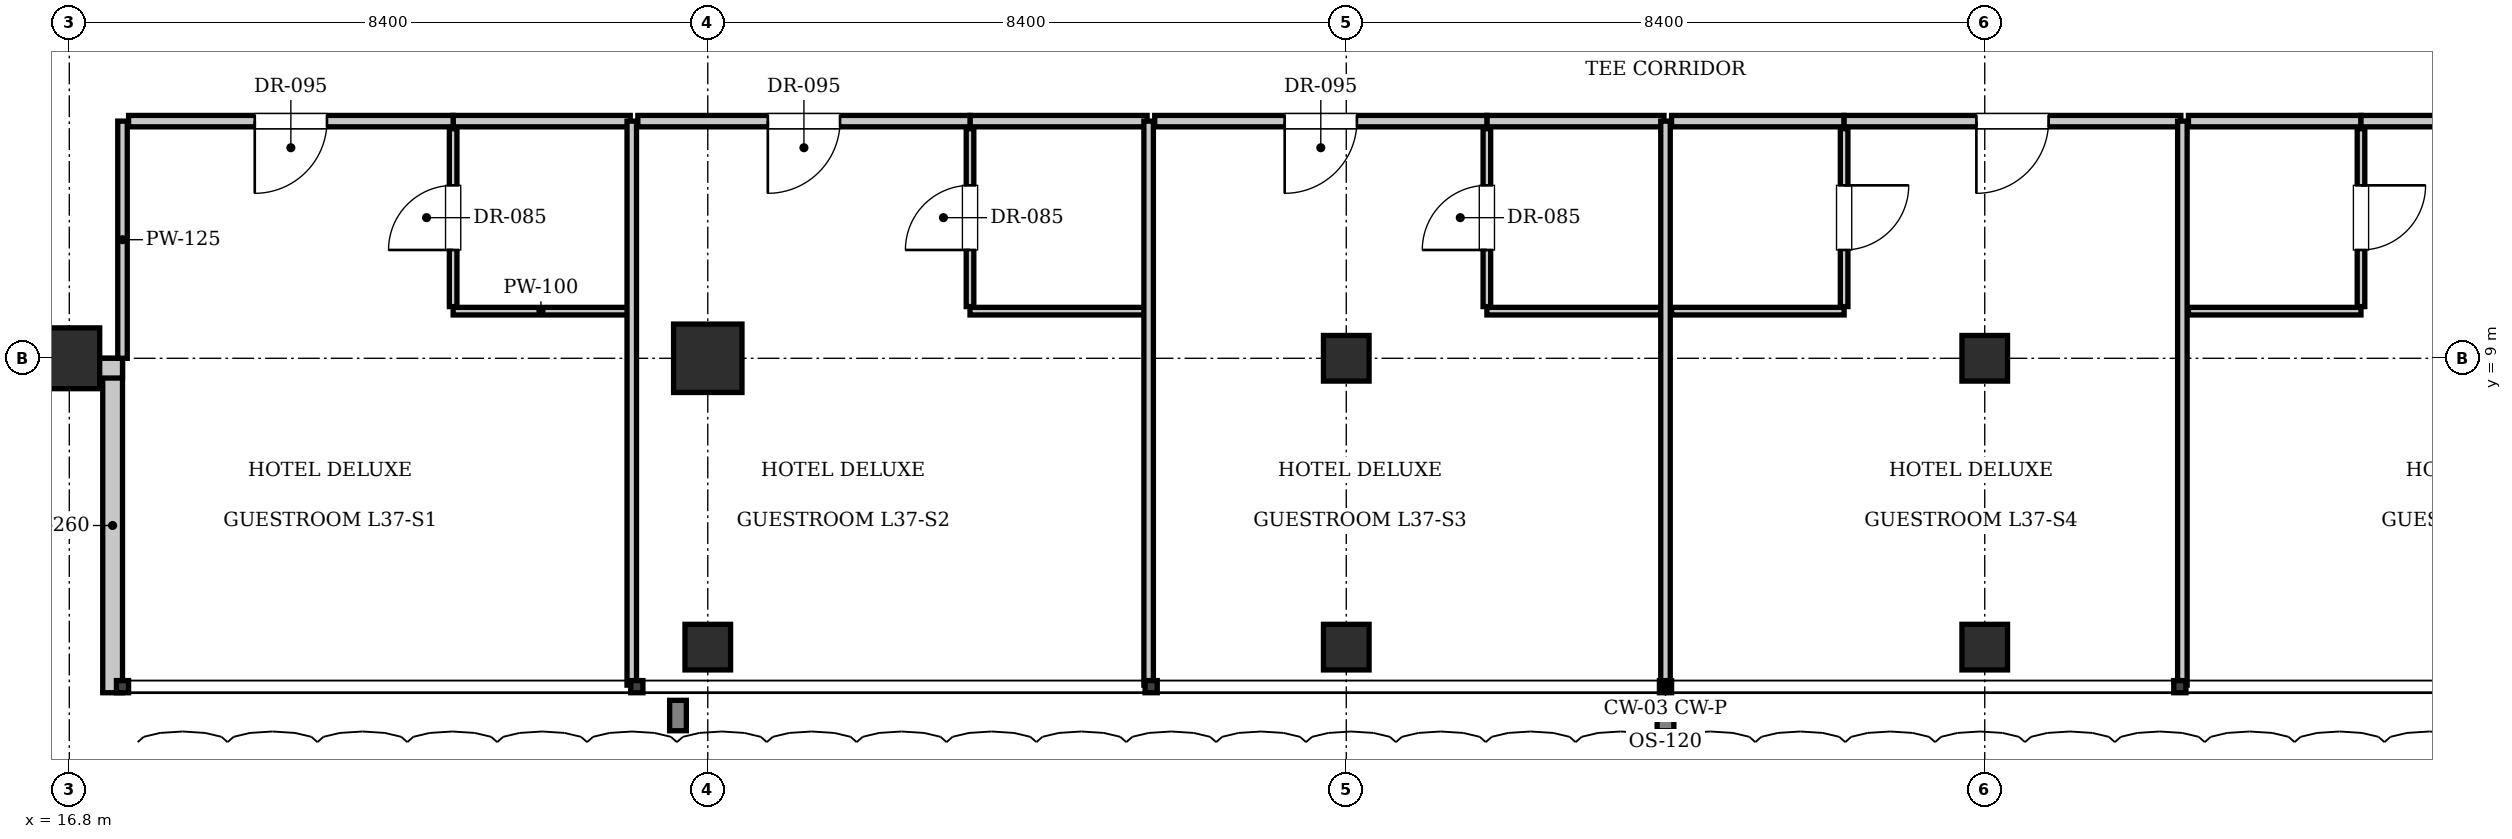
"""IFC4 building model, lengths in metres.
Left out: names, types, materials, properties, quantities, classifications, styles, units other than length and angle.
Written with IfcOpenShell. Run it as: python <this file> out.ifc"""

import sys

from ifc_helpers import new_model, si_unit, direction, frame, frame_2d, origin, origin_2d, place, context, subcontext, project, spatial, rectangle, i_section, extrude, element, fill, save


model = new_model("IFC4")
c1 = context("Model", 3, precision=1e-05, world=origin(), true_north=direction((0.0, 1.0)))
c2 = subcontext(c1, "Body", "Model", "MODEL_VIEW")
j1 = project(units=[si_unit("LENGTHUNIT", "METRE"), si_unit("PLANEANGLEUNIT", "RADIAN")], contexts=[c1])
p1 = place(None, origin())
s1 = spatial("IfcSite", under=j1, at=p1, CompositionType="ELEMENT")
p2 = place(p1, origin())
s2 = spatial("IfcBuilding", under=s1, at=p2, CompositionType="ELEMENT")
p3 = place(p2, frame((0.0, 0.0, 154.35)))
s3 = spatial("IfcBuildingStorey", under=s2, at=p3, CompositionType="ELEMENT", Elevation=154.35)
p4 = place(p3, frame((25.2, 9.0, 0.0), z_axis=(0.0, 0.0, 1.0), x_axis=(1.0, 0.0, 0.0)))
e1 = element("IfcColumn", 1, at=p4, inside=s3, PredefinedType="COLUMN", context=c2, shape_type="SweptSolid", body=[
    extrude(rectangle(XDim=0.9, YDim=0.9, at=origin_2d()), origin(), (0.0, 0.0, 1.0), 3.85),
])
for number, where, z_axis, x_axis in (
    (2, (33.6, 9.0, 0.0), (0.0, 0.0, 1.0), (1.0, 0.0, 0.0)),
    (3, (42.0, 9.0, 0.0), (0.0, 0.0, 1.0), (1.0, 0.0, 0.0)),
):
    element("IfcColumn", number, at=place(p3, frame(where, z_axis=z_axis, x_axis=x_axis)), inside=s3, PredefinedType="COLUMN", context=c2, shape_type="SweptSolid", body=[
        extrude(i_section(OverallWidth=0.6, OverallDepth=0.6, WebThickness=0.025, FlangeThickness=0.038, at=origin_2d()), origin(), (0.0, 0.0, 1.0), 3.85),
    ])
p5 = place(p3, frame((16.8, 9.0, 0.0), z_axis=(0.0, 0.0, 1.0), x_axis=(1.0, 0.0, 0.0)))
e4 = element("IfcColumn", 4, at=p5, inside=s3, PredefinedType="COLUMN", context=c2, shape_type="SweptSolid", body=[
    extrude(rectangle(XDim=0.8, YDim=0.8, at=origin_2d()), origin(), (0.0, 0.0, 1.0), 3.85),
])
for number, where, z_axis, x_axis in (
    (5, (25.2, 5.2, 0.0), (0.0, 0.0, 1.0), (1.0, 0.0, 0.0)),
    (6, (33.6, 5.2, 0.0), (0.0, 0.0, 1.0), (1.0, 0.0, 0.0)),
    (7, (42.0, 5.2, 0.0), (0.0, 0.0, 1.0), (1.0, 0.0, 0.0)),
):
    element("IfcColumn", number, at=place(p3, frame(where, z_axis=z_axis, x_axis=x_axis)), inside=s3, PredefinedType="COLUMN", context=c2, shape_type="SweptSolid", body=[
        extrude(i_section(OverallWidth=0.6, OverallDepth=0.6, WebThickness=0.025, FlangeThickness=0.038, at=origin_2d()), origin(), (0.0, 0.0, 1.0), 3.85),
    ])
p6 = place(p3, frame((17.37, 4.6, 0.0), z_axis=(0.0, 0.0, 1.0), x_axis=(0.0, 1.0, 0.0)))
e8 = element("IfcWall", 8, at=p6, inside=s3, PredefinedType="SOLIDWALL", context=c2, shape_type="SweptSolid", body=[
    extrude(rectangle(XDim=4.4, YDim=0.26, at=frame_2d((2.2, 0.0))), origin(), (0.0, 0.0, 1.0), 3.61),
])
p7 = place(p3, frame((17.5, 8.87, 0.0), z_axis=(0.0, 0.0, 1.0), x_axis=(-1.0, 0.0, 0.0)))
e9 = element("IfcWall", 9, at=p7, inside=s3, PredefinedType="SOLIDWALL", context=c2, shape_type="SweptSolid", body=[
    extrude(rectangle(XDim=4.4, YDim=0.26, at=frame_2d((2.2, 0.0))), origin(), (0.0, 0.0, 1.0), 3.007),
])
p8 = place(p3, frame((17.5, 9.0, 0.0), z_axis=(0.0, 0.0, 1.0), x_axis=(0.0, 1.0, 0.0)))
e10 = element("IfcWall", 10, at=p8, inside=s3, PredefinedType="PARTITIONING", context=c2, shape_type="SweptSolid", body=[
    extrude(rectangle(XDim=3.12, YDim=0.125, at=frame_2d((1.56, 0.0))), origin(), (0.0, 0.0, 1.0), 3.61),
])
p9 = place(p3, frame((21.85, 12.12, 0.0), z_axis=(0.0, 0.0, 1.0), x_axis=(1.0, 0.0, 0.0)))
e11 = element("IfcWall", 11, at=p9, inside=s3, PredefinedType="PARTITIONING", context=c2, shape_type="SweptSolid", body=[
    extrude(rectangle(XDim=2.33, YDim=0.15, at=frame_2d((1.165, 0.0))), origin(), (0.0, 0.0, 1.0), 3.61),
])
p10 = place(p3, frame((21.85, 9.62, 0.0), z_axis=(0.0, 0.0, 1.0), x_axis=(1.0, 0.0, 0.0)))
e12 = element("IfcWall", 12, at=p10, inside=s3, PredefinedType="PARTITIONING", context=c2, shape_type="SweptSolid", body=[
    extrude(rectangle(XDim=2.31, YDim=0.1, at=frame_2d((1.155, 0.0))), origin(), (0.0, 0.0, 1.0), 3.61),
])
p11 = place(p3, frame((21.85, 9.68, 0.0), z_axis=(0.0, 0.0, 1.0), x_axis=(0.0, 1.0, 0.0)))
e13 = element("IfcWall", 13, at=p11, inside=s3, PredefinedType="PARTITIONING", context=c2, shape_type="SweptSolid", body=[
    extrude(rectangle(XDim=2.34, YDim=0.1, at=frame_2d((1.17, 0.0))), origin(), (0.0, 0.0, 1.0), 3.61),
])
p12 = place(p11, frame((0.745, 0.0, 0.0)))
e14 = element("IfcOpeningElement", 14, at=p12, cuts=e13, PredefinedType="OPENING", context=c2, shape_type="SweptSolid", body=[
    extrude(rectangle(XDim=0.85, YDim=2.1, at=frame_2d((0.425, 1.05))), frame((0.0, 0.06, 0.0), z_axis=(0.0, -1.0, 0.0), x_axis=(1.0, 0.0, 0.0)), (0.0, 0.0, 1.0), 0.12),
])
p13 = place(p3, frame((17.58, 12.12, 0.0), z_axis=(0.0, 0.0, 1.0), x_axis=(1.0, 0.0, 0.0)))
e15 = element("IfcWall", 15, at=p13, inside=s3, PredefinedType="PARTITIONING", context=c2, shape_type="SweptSolid", body=[
    extrude(rectangle(XDim=4.27, YDim=0.15, at=frame_2d((2.135, 0.0))), origin(), (0.0, 0.0, 1.0), 3.61),
])
p14 = place(p13, frame((1.66, 0.0, 0.0)))
e16 = element("IfcOpeningElement", 16, at=p14, cuts=e15, PredefinedType="OPENING", context=c2, shape_type="SweptSolid", body=[
    extrude(rectangle(XDim=0.95, YDim=2.15, at=frame_2d((0.475, 1.075))), frame((0.0, 0.085, 0.0), z_axis=(0.0, -1.0, 0.0), x_axis=(1.0, 0.0, 0.0)), (0.0, 0.0, 1.0), 0.17),
])
p15 = place(p3, frame((24.2, 4.7, 0.0), z_axis=(0.0, 0.0, 1.0), x_axis=(0.0, 1.0, 0.0)))
e17 = element("IfcWall", 17, at=p15, inside=s3, PredefinedType="PARTITIONING", context=c2, shape_type="SweptSolid", body=[
    extrude(rectangle(XDim=7.42, YDim=0.125, at=frame_2d((3.71, 0.0))), origin(), (0.0, 0.0, 1.0), 3.61),
])
p16 = place(p3, frame((28.65, 12.12, 0.0), z_axis=(0.0, 0.0, 1.0), x_axis=(1.0, 0.0, 0.0)))
e18 = element("IfcWall", 18, at=p16, inside=s3, PredefinedType="PARTITIONING", context=c2, shape_type="SweptSolid", body=[
    extrude(rectangle(XDim=2.33, YDim=0.15, at=frame_2d((1.165, 0.0))), origin(), (0.0, 0.0, 1.0), 3.61),
])
p17 = place(p3, frame((28.65, 9.62, 0.0), z_axis=(0.0, 0.0, 1.0), x_axis=(1.0, 0.0, 0.0)))
e19 = element("IfcWall", 19, at=p17, inside=s3, PredefinedType="PARTITIONING", context=c2, shape_type="SweptSolid", body=[
    extrude(rectangle(XDim=2.31, YDim=0.1, at=frame_2d((1.155, 0.0))), origin(), (0.0, 0.0, 1.0), 3.61),
])
p18 = place(p3, frame((28.65, 9.68, 0.0), z_axis=(0.0, 0.0, 1.0), x_axis=(0.0, 1.0, 0.0)))
e20 = element("IfcWall", 20, at=p18, inside=s3, PredefinedType="PARTITIONING", context=c2, shape_type="SweptSolid", body=[
    extrude(rectangle(XDim=2.34, YDim=0.1, at=frame_2d((1.17, 0.0))), origin(), (0.0, 0.0, 1.0), 3.61),
])
p19 = place(p18, frame((0.745, 0.0, 0.0)))
e21 = element("IfcOpeningElement", 21, at=p19, cuts=e20, PredefinedType="OPENING", context=c2, shape_type="SweptSolid", body=[
    extrude(rectangle(XDim=0.85, YDim=2.1, at=frame_2d((0.425, 1.05))), frame((0.0, 0.06, 0.0), z_axis=(0.0, -1.0, 0.0), x_axis=(1.0, 0.0, 0.0)), (0.0, 0.0, 1.0), 0.12),
])
p20 = place(p3, frame((24.28, 12.12, 0.0), z_axis=(0.0, 0.0, 1.0), x_axis=(1.0, 0.0, 0.0)))
e22 = element("IfcWall", 22, at=p20, inside=s3, PredefinedType="PARTITIONING", context=c2, shape_type="SweptSolid", body=[
    extrude(rectangle(XDim=4.37, YDim=0.15, at=frame_2d((2.185, 0.0))), origin(), (0.0, 0.0, 1.0), 3.61),
])
p21 = place(p20, frame((1.71, 0.0, 0.0)))
e23 = element("IfcOpeningElement", 23, at=p21, cuts=e22, PredefinedType="OPENING", context=c2, shape_type="SweptSolid", body=[
    extrude(rectangle(XDim=0.95, YDim=2.15, at=frame_2d((0.475, 1.075))), frame((0.0, 0.085, 0.0), z_axis=(0.0, -1.0, 0.0), x_axis=(1.0, 0.0, 0.0)), (0.0, 0.0, 1.0), 0.17),
])
p22 = place(p3, frame((31.0, 4.7, 0.0), z_axis=(0.0, 0.0, 1.0), x_axis=(0.0, 1.0, 0.0)))
e24 = element("IfcWall", 24, at=p22, inside=s3, PredefinedType="PARTITIONING", context=c2, shape_type="SweptSolid", body=[
    extrude(rectangle(XDim=7.42, YDim=0.125, at=frame_2d((3.71, 0.0))), origin(), (0.0, 0.0, 1.0), 3.61),
])
p23 = place(p3, frame((35.45, 12.12, 0.0), z_axis=(0.0, 0.0, 1.0), x_axis=(1.0, 0.0, 0.0)))
e25 = element("IfcWall", 25, at=p23, inside=s3, PredefinedType="PARTITIONING", context=c2, shape_type="SweptSolid", body=[
    extrude(rectangle(XDim=2.33, YDim=0.15, at=frame_2d((1.165, 0.0))), origin(), (0.0, 0.0, 1.0), 3.61),
])
p24 = place(p3, frame((35.45, 9.62, 0.0), z_axis=(0.0, 0.0, 1.0), x_axis=(1.0, 0.0, 0.0)))
e26 = element("IfcWall", 26, at=p24, inside=s3, PredefinedType="PARTITIONING", context=c2, shape_type="SweptSolid", body=[
    extrude(rectangle(XDim=2.31, YDim=0.1, at=frame_2d((1.155, 0.0))), origin(), (0.0, 0.0, 1.0), 3.61),
])
p25 = place(p3, frame((35.45, 9.68, 0.0), z_axis=(0.0, 0.0, 1.0), x_axis=(0.0, 1.0, 0.0)))
e27 = element("IfcWall", 27, at=p25, inside=s3, PredefinedType="PARTITIONING", context=c2, shape_type="SweptSolid", body=[
    extrude(rectangle(XDim=2.34, YDim=0.1, at=frame_2d((1.17, 0.0))), origin(), (0.0, 0.0, 1.0), 3.61),
])
p26 = place(p25, frame((0.745, 0.0, 0.0)))
e28 = element("IfcOpeningElement", 28, at=p26, cuts=e27, PredefinedType="OPENING", context=c2, shape_type="SweptSolid", body=[
    extrude(rectangle(XDim=0.85, YDim=2.1, at=frame_2d((0.425, 1.05))), frame((0.0, 0.06, 0.0), z_axis=(0.0, -1.0, 0.0), x_axis=(1.0, 0.0, 0.0)), (0.0, 0.0, 1.0), 0.12),
])
p27 = place(p3, frame((31.08, 12.12, 0.0), z_axis=(0.0, 0.0, 1.0), x_axis=(1.0, 0.0, 0.0)))
e29 = element("IfcWall", 29, at=p27, inside=s3, PredefinedType="PARTITIONING", context=c2, shape_type="SweptSolid", body=[
    extrude(rectangle(XDim=4.37, YDim=0.15, at=frame_2d((2.185, 0.0))), origin(), (0.0, 0.0, 1.0), 3.61),
])
p28 = place(p27, frame((1.71, 0.0, 0.0)))
e30 = element("IfcOpeningElement", 30, at=p28, cuts=e29, PredefinedType="OPENING", context=c2, shape_type="SweptSolid", body=[
    extrude(rectangle(XDim=0.95, YDim=2.15, at=frame_2d((0.475, 1.075))), frame((0.0, 0.085, 0.0), z_axis=(0.0, -1.0, 0.0), x_axis=(1.0, 0.0, 0.0)), (0.0, 0.0, 1.0), 0.17),
])
p29 = place(p3, frame((37.8, 4.7, 0.0), z_axis=(0.0, 0.0, 1.0), x_axis=(0.0, 1.0, 0.0)))
e31 = element("IfcWall", 31, at=p29, inside=s3, PredefinedType="PARTITIONING", context=c2, shape_type="SweptSolid", body=[
    extrude(rectangle(XDim=7.42, YDim=0.125, at=frame_2d((3.71, 0.0))), origin(), (0.0, 0.0, 1.0), 3.3),
])
p30 = place(p3, frame((37.88, 12.12, 0.0), z_axis=(0.0, 0.0, 1.0), x_axis=(1.0, 0.0, 0.0)))
e32 = element("IfcWall", 32, at=p30, inside=s3, PredefinedType="PARTITIONING", context=c2, shape_type="SweptSolid", body=[
    extrude(rectangle(XDim=2.27, YDim=0.15, at=frame_2d((1.135, 0.0))), origin(), (0.0, 0.0, 1.0), 3.61),
])
p31 = place(p3, frame((37.88, 9.62, 0.0), z_axis=(0.0, 0.0, 1.0), x_axis=(1.0, 0.0, 0.0)))
e33 = element("IfcWall", 33, at=p31, inside=s3, PredefinedType="PARTITIONING", context=c2, shape_type="SweptSolid", body=[
    extrude(rectangle(XDim=2.27, YDim=0.1, at=frame_2d((1.135, 0.0))), origin(), (0.0, 0.0, 1.0), 3.61),
])
p32 = place(p3, frame((40.15, 9.68, 0.0), z_axis=(0.0, 0.0, 1.0), x_axis=(0.0, 1.0, 0.0)))
e34 = element("IfcWall", 34, at=p32, inside=s3, PredefinedType="PARTITIONING", context=c2, shape_type="SweptSolid", body=[
    extrude(rectangle(XDim=2.34, YDim=0.1, at=frame_2d((1.17, 0.0))), origin(), (0.0, 0.0, 1.0), 3.61),
])
p33 = place(p32, frame((0.745, 0.0, 0.0)))
e35 = element("IfcOpeningElement", 35, at=p33, cuts=e34, PredefinedType="OPENING", context=c2, shape_type="SweptSolid", body=[
    extrude(rectangle(XDim=0.85, YDim=2.1, at=frame_2d((0.425, 1.05))), frame((0.0, 0.06, 0.0), z_axis=(0.0, -1.0, 0.0), x_axis=(1.0, 0.0, 0.0)), (0.0, 0.0, 1.0), 0.12),
])
p34 = place(p3, frame((40.15, 12.12, 0.0), z_axis=(0.0, 0.0, 1.0), x_axis=(1.0, 0.0, 0.0)))
e36 = element("IfcWall", 36, at=p34, inside=s3, PredefinedType="PARTITIONING", context=c2, shape_type="SweptSolid", body=[
    extrude(rectangle(XDim=4.43, YDim=0.15, at=frame_2d((2.215, 0.0))), origin(), (0.0, 0.0, 1.0), 3.61),
])
p35 = place(p34, frame((1.74, 0.0, 0.0)))
e37 = element("IfcOpeningElement", 37, at=p35, cuts=e36, PredefinedType="OPENING", context=c2, shape_type="SweptSolid", body=[
    extrude(rectangle(XDim=0.95, YDim=2.15, at=frame_2d((0.475, 1.075))), frame((0.0, 0.085, 0.0), z_axis=(0.0, -1.0, 0.0), x_axis=(1.0, 0.0, 0.0)), (0.0, 0.0, 1.0), 0.17),
])
p36 = place(p3, frame((44.6, 4.7, 0.0), z_axis=(0.0, 0.0, 1.0), x_axis=(0.0, 1.0, 0.0)))
e38 = element("IfcWall", 38, at=p36, inside=s3, PredefinedType="PARTITIONING", context=c2, shape_type="SweptSolid", body=[
    extrude(rectangle(XDim=7.42, YDim=0.125, at=frame_2d((3.71, 0.0))), origin(), (0.0, 0.0, 1.0), 3.61),
])
p37 = place(p3, frame((44.68, 12.12, 0.0), z_axis=(0.0, 0.0, 1.0), x_axis=(1.0, 0.0, 0.0)))
e39 = element("IfcWall", 39, at=p37, inside=s3, PredefinedType="PARTITIONING", context=c2, shape_type="SweptSolid", body=[
    extrude(rectangle(XDim=2.27, YDim=0.15, at=frame_2d((1.135, 0.0))), origin(), (0.0, 0.0, 1.0), 3.61),
])
p38 = place(p3, frame((44.68, 9.62, 0.0), z_axis=(0.0, 0.0, 1.0), x_axis=(1.0, 0.0, 0.0)))
e40 = element("IfcWall", 40, at=p38, inside=s3, PredefinedType="PARTITIONING", context=c2, shape_type="SweptSolid", body=[
    extrude(rectangle(XDim=2.27, YDim=0.1, at=frame_2d((1.135, 0.0))), origin(), (0.0, 0.0, 1.0), 3.61),
])
p39 = place(p3, frame((46.95, 9.68, 0.0), z_axis=(0.0, 0.0, 1.0), x_axis=(0.0, 1.0, 0.0)))
e41 = element("IfcWall", 41, at=p39, inside=s3, PredefinedType="PARTITIONING", context=c2, shape_type="SweptSolid", body=[
    extrude(rectangle(XDim=2.34, YDim=0.1, at=frame_2d((1.17, 0.0))), origin(), (0.0, 0.0, 1.0), 3.61),
])
p40 = place(p39, frame((0.745, 0.0, 0.0)))
e42 = element("IfcOpeningElement", 42, at=p40, cuts=e41, PredefinedType="OPENING", context=c2, shape_type="SweptSolid", body=[
    extrude(rectangle(XDim=0.85, YDim=2.1, at=frame_2d((0.425, 1.05))), frame((0.0, 0.06, 0.0), z_axis=(0.0, -1.0, 0.0), x_axis=(1.0, 0.0, 0.0)), (0.0, 0.0, 1.0), 0.12),
])
p41 = place(p3, frame((46.95, 12.12, 0.0), z_axis=(0.0, 0.0, 1.0), x_axis=(1.0, 0.0, 0.0)))
e43 = element("IfcWall", 43, at=p41, inside=s3, PredefinedType="PARTITIONING", context=c2, shape_type="SweptSolid", body=[
    extrude(rectangle(XDim=4.43, YDim=0.15, at=frame_2d((2.215, 0.0))), origin(), (0.0, 0.0, 1.0), 3.61),
])
p42 = place(p41, frame((1.74, 0.0, 0.0)))
e44 = element("IfcOpeningElement", 44, at=p42, cuts=e43, PredefinedType="OPENING", context=c2, shape_type="SweptSolid", body=[
    extrude(rectangle(XDim=0.95, YDim=2.15, at=frame_2d((0.475, 1.075))), frame((0.0, 0.085, 0.0), z_axis=(0.0, -1.0, 0.0), x_axis=(1.0, 0.0, 0.0)), (0.0, 0.0, 1.0), 0.17),
])
p43 = place(p12, origin())
e45 = element("IfcDoor", 45, at=p43, inside=s3, OperationType="SINGLE_SWING_LEFT", PredefinedType="DOOR", context=c2, shape_type="SweptSolid", body=[
    extrude(rectangle(XDim=0.85, YDim=2.1, at=frame_2d((0.425, 1.05))), frame((0.0, 0.025, 0.0), z_axis=(0.0, -1.0, 0.0), x_axis=(1.0, 0.0, 0.0)), (0.0, 0.0, 1.0), 0.05),
])
fill(e14, e45)
p44 = place(p14, frame((0.95, 0.0, 0.0), z_axis=(0.0, 0.0, 1.0), x_axis=(-1.0, 0.0, 0.0)))
e46 = element("IfcDoor", 46, at=p44, inside=s3, OperationType="SINGLE_SWING_RIGHT", PredefinedType="DOOR", context=c2, shape_type="SweptSolid", body=[
    extrude(rectangle(XDim=0.95, YDim=2.15, at=frame_2d((0.475, 1.075))), frame((0.0, 0.025, 0.0), z_axis=(0.0, -1.0, 0.0), x_axis=(1.0, 0.0, 0.0)), (0.0, 0.0, 1.0), 0.05),
])
fill(e16, e46)
p45 = place(p19, origin())
e47 = element("IfcDoor", 47, at=p45, inside=s3, OperationType="SINGLE_SWING_LEFT", PredefinedType="DOOR", context=c2, shape_type="SweptSolid", body=[
    extrude(rectangle(XDim=0.85, YDim=2.1, at=frame_2d((0.425, 1.05))), frame((0.0, 0.025, 0.0), z_axis=(0.0, -1.0, 0.0), x_axis=(1.0, 0.0, 0.0)), (0.0, 0.0, 1.0), 0.05),
])
fill(e21, e47)
p46 = place(p21, frame((0.95, 0.0, 0.0), z_axis=(0.0, 0.0, 1.0), x_axis=(-1.0, 0.0, 0.0)))
e48 = element("IfcDoor", 48, at=p46, inside=s3, OperationType="SINGLE_SWING_RIGHT", PredefinedType="DOOR", context=c2, shape_type="SweptSolid", body=[
    extrude(rectangle(XDim=0.95, YDim=2.15, at=frame_2d((0.475, 1.075))), frame((0.0, 0.025, 0.0), z_axis=(0.0, -1.0, 0.0), x_axis=(1.0, 0.0, 0.0)), (0.0, 0.0, 1.0), 0.05),
])
fill(e23, e48)
p47 = place(p26, origin())
e49 = element("IfcDoor", 49, at=p47, inside=s3, OperationType="SINGLE_SWING_LEFT", PredefinedType="DOOR", context=c2, shape_type="SweptSolid", body=[
    extrude(rectangle(XDim=0.85, YDim=2.1, at=frame_2d((0.425, 1.05))), frame((0.0, 0.025, 0.0), z_axis=(0.0, -1.0, 0.0), x_axis=(1.0, 0.0, 0.0)), (0.0, 0.0, 1.0), 0.05),
])
fill(e28, e49)
p48 = place(p28, frame((0.95, 0.0, 0.0), z_axis=(0.0, 0.0, 1.0), x_axis=(-1.0, 0.0, 0.0)))
e50 = element("IfcDoor", 50, at=p48, inside=s3, OperationType="SINGLE_SWING_RIGHT", PredefinedType="DOOR", context=c2, shape_type="SweptSolid", body=[
    extrude(rectangle(XDim=0.95, YDim=2.15, at=frame_2d((0.475, 1.075))), frame((0.0, 0.025, 0.0), z_axis=(0.0, -1.0, 0.0), x_axis=(1.0, 0.0, 0.0)), (0.0, 0.0, 1.0), 0.05),
])
fill(e30, e50)
p49 = place(p33, frame((0.85, 0.0, 0.0), z_axis=(0.0, 0.0, 1.0), x_axis=(-1.0, 0.0, 0.0)))
e51 = element("IfcDoor", 51, at=p49, inside=s3, OperationType="SINGLE_SWING_LEFT", PredefinedType="DOOR", context=c2, shape_type="SweptSolid", body=[
    extrude(rectangle(XDim=0.85, YDim=2.1, at=frame_2d((0.425, 1.05))), frame((0.0, 0.025, 0.0), z_axis=(0.0, -1.0, 0.0), x_axis=(1.0, 0.0, 0.0)), (0.0, 0.0, 1.0), 0.05),
])
fill(e35, e51)
p50 = place(p35, frame((0.95, 0.0, 0.0), z_axis=(0.0, 0.0, 1.0), x_axis=(-1.0, 0.0, 0.0)))
e52 = element("IfcDoor", 52, at=p50, inside=s3, OperationType="SINGLE_SWING_RIGHT", PredefinedType="DOOR", context=c2, shape_type="SweptSolid", body=[
    extrude(rectangle(XDim=0.95, YDim=2.15, at=frame_2d((0.475, 1.075))), frame((0.0, 0.025, 0.0), z_axis=(0.0, -1.0, 0.0), x_axis=(1.0, 0.0, 0.0)), (0.0, 0.0, 1.0), 0.05),
])
fill(e37, e52)
p51 = place(p40, frame((0.85, 0.0, 0.0), z_axis=(0.0, 0.0, 1.0), x_axis=(-1.0, 0.0, 0.0)))
e53 = element("IfcDoor", 53, at=p51, inside=s3, OperationType="SINGLE_SWING_LEFT", PredefinedType="DOOR", context=c2, shape_type="SweptSolid", body=[
    extrude(rectangle(XDim=0.85, YDim=2.1, at=frame_2d((0.425, 1.05))), frame((0.0, 0.025, 0.0), z_axis=(0.0, -1.0, 0.0), x_axis=(1.0, 0.0, 0.0)), (0.0, 0.0, 1.0), 0.05),
])
fill(e42, e53)
save(model, sys.argv[1])
